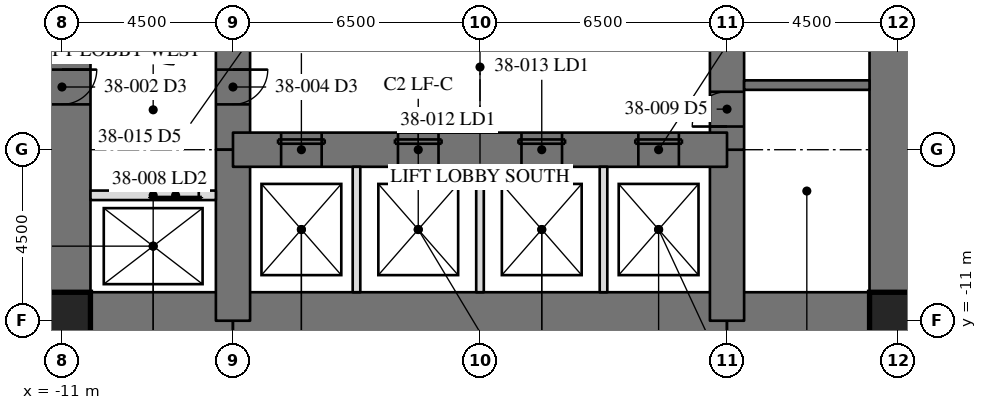
"""IFC4 building model, lengths in metres.
Left out: names, types, materials, properties, quantities, classifications, styles, units other than length and angle.
Written with IfcOpenShell. Run it as: python <this file> out.ifc"""

import sys

from ifc_helpers import new_model, si_unit, direction, frame, frame_2d, origin, origin_2d, place, context, subcontext, project, spatial, rectangle, hollow_rectangle, extrude, element, fill, save


model = new_model("IFC4")
c1 = context("Model", 3, precision=1e-05, world=origin(), true_north=direction((0.0, 1.0)))
c2 = subcontext(c1, "Body", "Model", "MODEL_VIEW")
j1 = project(units=[si_unit("LENGTHUNIT", "METRE"), si_unit("PLANEANGLEUNIT", "RADIAN")], contexts=[c1])
p1 = place(None, origin())
s1 = spatial("IfcSite", under=j1, at=p1, CompositionType="ELEMENT")
p2 = place(p1, origin())
s2 = spatial("IfcBuilding", under=s1, at=p2, CompositionType="ELEMENT")
p3 = place(p2, frame((0.0, 0.0, 162.3)))
s3 = spatial("IfcBuildingStorey", under=s2, at=p3, CompositionType="ELEMENT", Elevation=162.3)
p4 = place(p3, frame((11.0, -11.0, 0.0), z_axis=(0.0, 0.0, 1.0), x_axis=(0.0, 1.0, 0.0)))
e1 = element("IfcWall", 1, at=p4, inside=s3, PredefinedType="SHEAR", context=c2, shape_type="SweptSolid", body=[
    extrude(rectangle(XDim=22.0, YDim=1.5, at=frame_2d((11.0, 0.0))), origin(), (0.0, 0.0, 1.0), 4.1),
])
p5 = place(p4, frame((15.393, 0.0, 0.0)))
e2 = element("IfcOpeningElement", 2, at=p5, cuts=e1, PredefinedType="OPENING", context=c2, shape_type="SweptSolid", body=[
    extrude(rectangle(XDim=0.915, YDim=2.134, at=frame_2d((0.458, 1.067))), frame((0.0, 0.76, 0.0), z_axis=(0.0, -1.0, 0.0), x_axis=(1.0, 0.0, 0.0)), (0.0, 0.0, 1.0), 1.52),
])
p6 = place(p3, frame((-11.0, 11.0, 0.0), z_axis=(0.0, 0.0, 1.0), x_axis=(0.0, -1.0, 0.0)))
e3 = element("IfcWall", 3, at=p6, inside=s3, PredefinedType="SHEAR", context=c2, shape_type="SweptSolid", body=[
    extrude(rectangle(XDim=22.0, YDim=1.5, at=frame_2d((11.0, 0.0))), origin(), (0.0, 0.0, 1.0), 4.1),
])
p7 = place(p6, frame((15.393, 0.0, 0.0)))
e4 = element("IfcOpeningElement", 4, at=p7, cuts=e3, PredefinedType="OPENING", context=c2, shape_type="SweptSolid", body=[
    extrude(rectangle(XDim=0.915, YDim=2.134, at=frame_2d((0.458, 1.067))), frame((0.0, 0.76, 0.0), z_axis=(0.0, -1.0, 0.0), x_axis=(1.0, 0.0, 0.0)), (0.0, 0.0, 1.0), 1.52),
])
p8 = place(p3, frame((-11.0, -11.0, 0.0), z_axis=(0.0, 0.0, 1.0), x_axis=(1.0, 0.0, 0.0)))
e5 = element("IfcWall", 5, at=p8, inside=s3, PredefinedType="SHEAR", context=c2, shape_type="SweptSolid", body=[
    extrude(rectangle(XDim=4.5, YDim=1.5, at=frame_2d((2.25, 0.0))), origin(), (0.0, 0.0, 1.0), 4.1),
])
p9 = place(p3, frame((-6.5, -11.0, 0.0), z_axis=(0.0, 0.0, 1.0), x_axis=(1.0, 0.0, 0.0)))
e6 = element("IfcWall", 6, at=p9, inside=s3, PredefinedType="SHEAR", context=c2, shape_type="SweptSolid", body=[
    extrude(rectangle(XDim=13.0, YDim=1.5, at=frame_2d((6.5, 0.0))), origin(), (0.0, 0.0, 1.0), 4.1),
])
p10 = place(p3, frame((6.5, -11.0, 0.0), z_axis=(0.0, 0.0, 1.0), x_axis=(1.0, 0.0, 0.0)))
e7 = element("IfcWall", 7, at=p10, inside=s3, PredefinedType="SHEAR", context=c2, shape_type="SweptSolid", body=[
    extrude(rectangle(XDim=4.5, YDim=1.5, at=frame_2d((2.25, 0.0))), origin(), (0.0, 0.0, 1.0), 4.1),
])
p11 = place(p3, frame((6.5, -11.0, 0.0), z_axis=(0.0, 0.0, 1.0), x_axis=(0.0, 1.0, 0.0)))
e8 = element("IfcWall", 8, at=p11, inside=s3, PredefinedType="SHEAR", context=c2, shape_type="SweptSolid", body=[
    extrude(rectangle(XDim=4.5, YDim=0.9, at=frame_2d((2.25, 0.0))), origin(), (0.0, 0.0, 1.0), 4.1),
])
p12 = place(p3, frame((6.5, -6.5, 0.0), z_axis=(0.0, 0.0, 1.0), x_axis=(0.0, 1.0, 0.0)))
e9 = element("IfcWall", 9, at=p12, inside=s3, PredefinedType="SHEAR", context=c2, shape_type="SweptSolid", body=[
    extrude(rectangle(XDim=13.0, YDim=0.9, at=frame_2d((6.5, 0.0))), origin(), (0.0, 0.0, 1.0), 4.1),
])
p13 = place(p12, frame((10.893, 0.0, 0.0)))
e10 = element("IfcOpeningElement", 10, at=p13, cuts=e9, PredefinedType="OPENING", context=c2, shape_type="SweptSolid", body=[
    extrude(rectangle(XDim=0.915, YDim=2.134, at=frame_2d((0.458, 1.067))), frame((0.0, 0.46, 0.0), z_axis=(0.0, -1.0, 0.0), x_axis=(1.0, 0.0, 0.0)), (0.0, 0.0, 1.0), 0.92),
])
p14 = place(p12, frame((0.61, 0.0, 0.0)))
e11 = element("IfcOpeningElement", 11, at=p14, cuts=e9, PredefinedType="OPENING", context=c2, shape_type="SweptSolid", body=[
    extrude(rectangle(XDim=0.915, YDim=2.134, at=frame_2d((0.458, 1.067))), frame((0.0, 0.46, 0.0), z_axis=(0.0, -1.0, 0.0), x_axis=(1.0, 0.0, 0.0)), (0.0, 0.0, 1.0), 0.92),
])
p15 = place(p3, frame((-6.5, 6.5, 0.0), z_axis=(0.0, 0.0, 1.0), x_axis=(0.0, -1.0, 0.0)))
e12 = element("IfcWall", 12, at=p15, inside=s3, PredefinedType="SHEAR", context=c2, shape_type="SweptSolid", body=[
    extrude(rectangle(XDim=13.0, YDim=0.9, at=frame_2d((6.5, 0.0))), origin(), (0.0, 0.0, 1.0), 4.1),
])
p16 = place(p15, frame((10.893, 0.0, 0.0)))
e13 = element("IfcOpeningElement", 13, at=p16, cuts=e12, PredefinedType="OPENING", context=c2, shape_type="SweptSolid", body=[
    extrude(rectangle(XDim=0.915, YDim=2.134, at=frame_2d((0.458, 1.067))), frame((0.0, 0.46, 0.0), z_axis=(0.0, -1.0, 0.0), x_axis=(1.0, 0.0, 0.0)), (0.0, 0.0, 1.0), 0.92),
])
p17 = place(p15, frame((0.61, 0.0, 0.0)))
e14 = element("IfcOpeningElement", 14, at=p17, cuts=e12, PredefinedType="OPENING", context=c2, shape_type="SweptSolid", body=[
    extrude(rectangle(XDim=0.915, YDim=2.134, at=frame_2d((0.458, 1.067))), frame((0.0, 0.46, 0.0), z_axis=(0.0, -1.0, 0.0), x_axis=(1.0, 0.0, 0.0)), (0.0, 0.0, 1.0), 0.92),
])
p18 = place(p3, frame((-6.5, -6.5, 0.0), z_axis=(0.0, 0.0, 1.0), x_axis=(0.0, -1.0, 0.0)))
e15 = element("IfcWall", 15, at=p18, inside=s3, PredefinedType="SHEAR", context=c2, shape_type="SweptSolid", body=[
    extrude(rectangle(XDim=4.5, YDim=0.9, at=frame_2d((2.25, 0.0))), origin(), (0.0, 0.0, 1.0), 4.1),
])
p19 = place(p3, frame((-6.5, -6.5, 0.0), z_axis=(0.0, 0.0, 1.0), x_axis=(1.0, 0.0, 0.0)))
e16 = element("IfcWall", 16, at=p19, inside=s3, PredefinedType="SHEAR", context=c2, shape_type="SweptSolid", body=[
    extrude(rectangle(XDim=13.0, YDim=0.9, at=frame_2d((6.5, 0.0))), origin(), (0.0, 0.0, 1.0), 4.1),
])
p20 = place(p19, frame((1.267, 0.0, 0.0)))
e17 = element("IfcOpeningElement", 17, at=p20, cuts=e16, PredefinedType="OPENING", context=c2, shape_type="SweptSolid", body=[
    extrude(rectangle(XDim=1.067, YDim=2.134, at=frame_2d((0.533, 1.067))), frame((0.0, 0.46, 0.0), z_axis=(0.0, -1.0, 0.0), x_axis=(1.0, 0.0, 0.0)), (0.0, 0.0, 1.0), 0.92),
])
p21 = place(p19, frame((4.342, 0.0, 0.0)))
e18 = element("IfcOpeningElement", 18, at=p21, cuts=e16, PredefinedType="OPENING", context=c2, shape_type="SweptSolid", body=[
    extrude(rectangle(XDim=1.067, YDim=2.134, at=frame_2d((0.533, 1.067))), frame((0.0, 0.46, 0.0), z_axis=(0.0, -1.0, 0.0), x_axis=(1.0, 0.0, 0.0)), (0.0, 0.0, 1.0), 0.92),
])
p22 = place(p19, frame((7.592, 0.0, 0.0)))
e19 = element("IfcOpeningElement", 19, at=p22, cuts=e16, PredefinedType="OPENING", context=c2, shape_type="SweptSolid", body=[
    extrude(rectangle(XDim=1.067, YDim=2.134, at=frame_2d((0.533, 1.067))), frame((0.0, 0.46, 0.0), z_axis=(0.0, -1.0, 0.0), x_axis=(1.0, 0.0, 0.0)), (0.0, 0.0, 1.0), 0.92),
])
p23 = place(p19, frame((10.667, 0.0, 0.0)))
e20 = element("IfcOpeningElement", 20, at=p23, cuts=e16, PredefinedType="OPENING", context=c2, shape_type="SweptSolid", body=[
    extrude(rectangle(XDim=1.067, YDim=2.134, at=frame_2d((0.533, 1.067))), frame((0.0, 0.46, 0.0), z_axis=(0.0, -1.0, 0.0), x_axis=(1.0, 0.0, 0.0)), (0.0, 0.0, 1.0), 0.92),
])
for number, where, z_axis, x_axis in (
    (21, (-11.0, -11.0, 0.0), (0.0, 0.0, 1.0), (1.0, 0.0, 0.0)),
    (22, (11.0, -11.0, 0.0), (0.0, 0.0, 1.0), (1.0, 0.0, 0.0)),
):
    element("IfcColumn", number, at=place(p3, frame(where, z_axis=z_axis, x_axis=x_axis)), inside=s3, PredefinedType="COLUMN", context=c2, shape_type="SweptSolid", body=[
        extrude(hollow_rectangle(XDim=1.499, YDim=1.499, WallThickness=0.102, at=origin_2d()), origin(), (0.0, 0.0, 1.0), 4.1),
    ])
p24 = place(p3, frame((6.95, -4.8, 0.0), z_axis=(0.0, 0.0, 1.0), x_axis=(1.0, 0.0, 0.0)))
e23 = element("IfcWall", 23, at=p24, inside=s3, PredefinedType="SOLIDWALL", context=c2, shape_type="SweptSolid", body=[
    extrude(rectangle(XDim=3.3, YDim=0.25, at=frame_2d((1.65, 0.0))), origin(), (0.0, 0.0, 1.0), 3.91),
])
p25 = place(p3, frame((-6.95, -7.7, 0.0), z_axis=(0.0, 0.0, 1.0), x_axis=(-1.0, 0.0, 0.0)))
e24 = element("IfcWall", 24, at=p25, inside=s3, PredefinedType="PARTITIONING", context=c2, shape_type="SweptSolid", body=[
    extrude(rectangle(XDim=3.3, YDim=0.25, at=frame_2d((1.65, 0.0))), origin(), (0.0, 0.0, 1.0), 3.91),
])
p26 = place(p25, frame((0.45, 0.0, 0.0)))
e25 = element("IfcOpeningElement", 25, at=p26, cuts=e24, PredefinedType="OPENING", context=c2, shape_type="SweptSolid", body=[
    extrude(rectangle(XDim=1.219, YDim=2.134, at=frame_2d((0.609, 1.067))), frame((0.0, 0.135, 0.0), z_axis=(0.0, -1.0, 0.0), x_axis=(1.0, 0.0, 0.0)), (0.0, 0.0, 1.0), 0.27),
])
for number, where, z_axis, x_axis in (
    (26, (-3.25, -10.25, 0.0), (0.0, 0.0, 1.0), (0.0, 1.0, 0.0)),
    (27, (0.0, -10.25, 0.0), (0.0, 0.0, 1.0), (0.0, 1.0, 0.0)),
    (28, (3.25, -10.25, 0.0), (0.0, 0.0, 1.0), (0.0, 1.0, 0.0)),
):
    element("IfcWall", number, at=place(p3, frame(where, z_axis=z_axis, x_axis=x_axis)), inside=s3, PredefinedType="PARTITIONING", context=c2, shape_type="SweptSolid", body=[
        extrude(rectangle(XDim=3.3, YDim=0.2, at=frame_2d((1.65, 0.0))), origin(), (0.0, 0.0, 1.0), 3.91),
    ])
p27 = place(p16, origin())
e29 = element("IfcDoor", 29, at=p27, inside=s3, OperationType="SINGLE_SWING_RIGHT", PredefinedType="DOOR", context=c2, shape_type="SweptSolid", body=[
    extrude(rectangle(XDim=0.915, YDim=2.134, at=frame_2d((0.458, 1.067))), frame((0.0, -0.375, 0.0), z_axis=(0.0, -1.0, 0.0), x_axis=(1.0, 0.0, 0.0)), (0.0, 0.0, 1.0), 0.05),
])
fill(e13, e29)
p28 = place(p26, origin())
e30 = element("IfcDoor", 30, at=p28, inside=s3, OperationType="SLIDING_TO_LEFT", PredefinedType="DOOR", context=c2, shape_type="SweptSolid", body=[
    extrude(rectangle(XDim=1.219, YDim=2.134, at=frame_2d((0.609, 1.067))), frame((0.0, 0.025, 0.0), z_axis=(0.0, -1.0, 0.0), x_axis=(1.0, 0.0, 0.0)), (0.0, 0.0, 1.0), 0.05),
])
fill(e25, e30)
p29 = place(p14, origin())
e31 = element("IfcDoor", 31, at=p29, inside=s3, OperationType="SINGLE_SWING_RIGHT", PredefinedType="DOOR", context=c2, shape_type="SweptSolid", body=[
    extrude(rectangle(XDim=0.915, YDim=2.134, at=frame_2d((0.458, 1.067))), frame((0.0, -0.375, 0.0), z_axis=(0.0, -1.0, 0.0), x_axis=(1.0, 0.0, 0.0)), (0.0, 0.0, 1.0), 0.05),
])
fill(e11, e31)
p30 = place(p20, origin())
e32 = element("IfcDoor", 32, at=p30, inside=s3, OperationType="SLIDING_TO_LEFT", PredefinedType="DOOR", context=c2, shape_type="SweptSolid", body=[
    extrude(rectangle(XDim=1.067, YDim=2.134, at=frame_2d((0.533, 1.067))), frame((0.0, -0.375, 0.0), z_axis=(0.0, -1.0, 0.0), x_axis=(1.0, 0.0, 0.0)), (0.0, 0.0, 1.0), 0.05),
])
fill(e17, e32)
p31 = place(p21, origin())
e33 = element("IfcDoor", 33, at=p31, inside=s3, OperationType="SLIDING_TO_LEFT", PredefinedType="DOOR", context=c2, shape_type="SweptSolid", body=[
    extrude(rectangle(XDim=1.067, YDim=2.134, at=frame_2d((0.533, 1.067))), frame((0.0, -0.375, 0.0), z_axis=(0.0, -1.0, 0.0), x_axis=(1.0, 0.0, 0.0)), (0.0, 0.0, 1.0), 0.05),
])
fill(e18, e33)
p32 = place(p22, origin())
e34 = element("IfcDoor", 34, at=p32, inside=s3, OperationType="SLIDING_TO_LEFT", PredefinedType="DOOR", context=c2, shape_type="SweptSolid", body=[
    extrude(rectangle(XDim=1.067, YDim=2.134, at=frame_2d((0.533, 1.067))), frame((0.0, -0.375, 0.0), z_axis=(0.0, -1.0, 0.0), x_axis=(1.0, 0.0, 0.0)), (0.0, 0.0, 1.0), 0.05),
])
fill(e19, e34)
p33 = place(p23, origin())
e35 = element("IfcDoor", 35, at=p33, inside=s3, OperationType="SLIDING_TO_LEFT", PredefinedType="DOOR", context=c2, shape_type="SweptSolid", body=[
    extrude(rectangle(XDim=1.067, YDim=2.134, at=frame_2d((0.533, 1.067))), frame((0.0, -0.375, 0.0), z_axis=(0.0, -1.0, 0.0), x_axis=(1.0, 0.0, 0.0)), (0.0, 0.0, 1.0), 0.05),
])
fill(e20, e35)
save(model, sys.argv[1])
